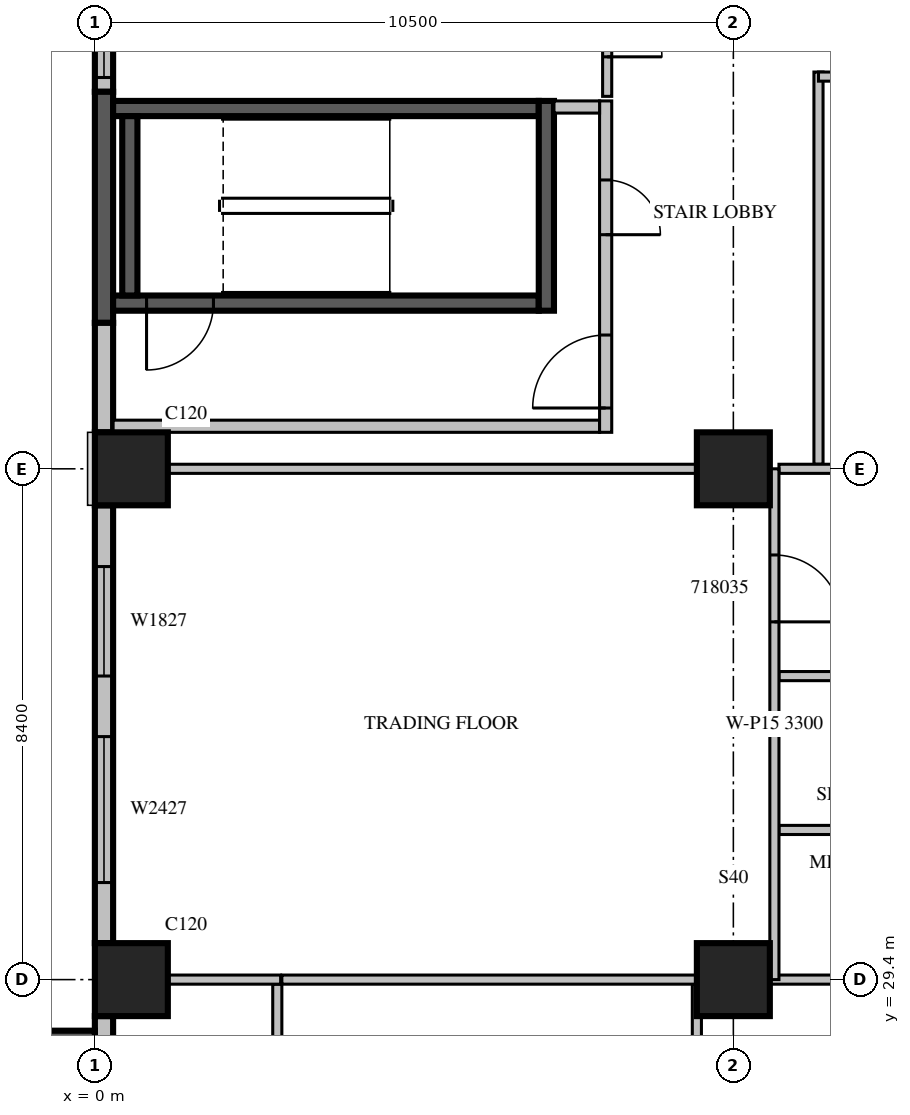
"""IFC4 building model, lengths in metres.
Left out: names, types, materials, properties, quantities, classifications, styles, units other than length and angle.
Written with IfcOpenShell. Run it as: python <this file> out.ifc"""

import sys

from ifc_helpers import new_model, si_unit, direction, frame, frame_2d, origin, origin_2d, place, context, subcontext, project, spatial, rectangle, extrude, source, transform, mapped, element, fill, save


model = new_model("IFC4")
c1 = context("Model", 3, precision=1e-05, world=origin(), true_north=direction((0.0, 1.0)))
c2 = subcontext(c1, "Body", "Model", "MODEL_VIEW")
j1 = project(units=[si_unit("LENGTHUNIT", "METRE"), si_unit("PLANEANGLEUNIT", "RADIAN")], contexts=[c1])
p1 = place(None, origin())
s1 = spatial("IfcSite", under=j1, at=p1, CompositionType="ELEMENT")
p2 = place(p1, origin())
s2 = spatial("IfcBuilding", under=s1, at=p2, CompositionType="ELEMENT")
p3 = place(p2, frame((0.0, 0.0, 86.7)))
s3 = spatial("IfcBuildingStorey", under=s2, at=p3, CompositionType="ELEMENT", Elevation=86.7)
m1 = source(origin(), c2, "Body", "SweptSolid", [
    extrude(rectangle(XDim=1.2, YDim=1.2, at=origin_2d()), origin(), (0.0, 0.0, 1.0), 4.2),
])
for number, where, z_axis, x_axis in (
    (1, (0.6, 29.4, 0.0), (0.0, 0.0, 1.0), (1.0, 0.0, 0.0)),
    (2, (10.5, 29.4, 0.0), (0.0, 0.0, 1.0), (1.0, 0.0, 0.0)),
    (3, (0.6, 37.8, 0.0), (0.0, 0.0, 1.0), (1.0, 0.0, 0.0)),
    (4, (10.5, 37.8, 0.0), (0.0, 0.0, 1.0), (1.0, 0.0, 0.0)),
):
    element("IfcColumn", number, at=place(p3, frame(where, z_axis=z_axis, x_axis=x_axis)), inside=s3, PredefinedType="COLUMN", context=c2, shape_type="MappedRepresentation", body=[
        mapped(m1, transform((0.0, 0.0, 0.0), scale=1.0)),
    ])
m2 = source(origin(), c2, "Body", "SweptSolid", [
    extrude(rectangle(XDim=1.6, YDim=0.3, at=frame_2d((0.8, 0.0))), origin(), (0.0, 0.0, 1.0), 3.8),
])
p4 = place(p3, frame((0.15, 45.6, 0.0), z_axis=(0.0, 0.0, 1.0), x_axis=(0.0, -1.0, 0.0)))
e5 = element("IfcWall", 5, at=p4, inside=s3, PredefinedType="STANDARD", context=c2, shape_type="MappedRepresentation", body=[
    mapped(m2, transform((0.0, 0.0, 0.0), scale=1.0)),
])
m3 = source(origin(), c2, "Body", "SweptSolid", [
    extrude(rectangle(XDim=1.2, YDim=2.7, at=frame_2d((0.6, 1.35))), frame((0.0, 0.16, 0.0), z_axis=(0.0, -1.0, 0.0), x_axis=(1.0, 0.0, 0.0)), (0.0, 0.0, 1.0), 0.32),
])
p5 = place(p4, frame((0.165, 0.0, 0.6)))
e6 = element("IfcOpeningElement", 6, at=p5, cuts=e5, PredefinedType="OPENING", context=c2, shape_type="MappedRepresentation", body=[
    mapped(m3, transform((0.0, 0.0, 0.0), scale=1.0)),
])
m4 = source(origin(), c2, "Body", "SweptSolid", [
    extrude(rectangle(XDim=3.8, YDim=0.3, at=frame_2d((1.9, 0.0))), origin(), (0.0, 0.0, 1.0), 3.8),
])
p6 = place(p3, frame((0.15, 44.0, 0.0), z_axis=(0.0, 0.0, 1.0), x_axis=(0.0, -1.0, 0.0)))
e7 = element("IfcWall", 7, at=p6, inside=s3, PredefinedType="SOLIDWALL", context=c2, shape_type="MappedRepresentation", body=[
    mapped(m4, transform((0.0, 0.0, 0.0), scale=1.0)),
])
m5 = source(origin(), c2, "Body", "SweptSolid", [
    extrude(rectangle(XDim=1.8, YDim=0.3, at=frame_2d((0.9, 0.0))), origin(), (0.0, 0.0, 1.0), 3.8),
])
p7 = place(p3, frame((0.15, 40.2, 0.0), z_axis=(0.0, 0.0, 1.0), x_axis=(0.0, -1.0, 0.0)))
e8 = element("IfcWall", 8, at=p7, inside=s3, PredefinedType="STANDARD", context=c2, shape_type="MappedRepresentation", body=[
    mapped(m5, transform((0.0, 0.0, 0.0), scale=1.0)),
])
m6 = source(origin(), c2, "Body", "SweptSolid", [
    extrude(rectangle(XDim=7.2, YDim=0.3, at=frame_2d((3.6, 0.0))), origin(), (0.0, 0.0, 1.0), 3.8),
])
p8 = place(p3, frame((0.15, 37.2, 0.0), z_axis=(0.0, 0.0, 1.0), x_axis=(0.0, -1.0, 0.0)))
e9 = element("IfcWall", 9, at=p8, inside=s3, PredefinedType="STANDARD", context=c2, shape_type="MappedRepresentation", body=[
    mapped(m6, transform((0.0, 0.0, 0.0), scale=1.0)),
])
m7 = source(origin(), c2, "Body", "SweptSolid", [
    extrude(rectangle(XDim=1.8, YDim=2.7, at=frame_2d((0.9, 1.35))), frame((0.0, 0.16, 0.0), z_axis=(0.0, -1.0, 0.0), x_axis=(1.0, 0.0, 0.0)), (0.0, 0.0, 1.0), 0.32),
])
p9 = place(p8, frame((1.008, 0.0, 0.6)))
e10 = element("IfcOpeningElement", 10, at=p9, cuts=e9, PredefinedType="OPENING", context=c2, shape_type="MappedRepresentation", body=[
    mapped(m7, transform((0.0, 0.0, 0.0), scale=1.0)),
])
m8 = source(origin(), c2, "Body", "SweptSolid", [
    extrude(rectangle(XDim=2.4, YDim=2.7, at=frame_2d((1.2, 1.35))), frame((0.0, 0.16, 0.0), z_axis=(0.0, -1.0, 0.0), x_axis=(1.0, 0.0, 0.0)), (0.0, 0.0, 1.0), 0.32),
])
p10 = place(p8, frame((3.804, 0.0, 0.6)))
e11 = element("IfcOpeningElement", 11, at=p10, cuts=e9, PredefinedType="OPENING", context=c2, shape_type="MappedRepresentation", body=[
    mapped(m8, transform((0.0, 0.0, 0.0), scale=1.0)),
])
p11 = place(p3, frame((0.15, 28.8, 0.0), z_axis=(0.0, 0.0, 1.0), x_axis=(0.0, -1.0, 0.0)))
e12 = element("IfcWall", 12, at=p11, inside=s3, PredefinedType="STANDARD", context=c2, shape_type="MappedRepresentation", body=[
    mapped(m6, transform((0.0, 0.0, 0.0), scale=1.0)),
])
m9 = source(origin(), c2, "Body", "SweptSolid", [
    extrude(rectangle(XDim=1.0, YDim=2.1, at=frame_2d((0.5, 1.05))), frame((0.0, 0.16, 0.0), z_axis=(0.0, -1.0, 0.0), x_axis=(1.0, 0.0, 0.0)), (0.0, 0.0, 1.0), 0.32),
])
p12 = place(p11, frame((1.84, 0.0, 0.0)))
e13 = element("IfcOpeningElement", 13, at=p12, cuts=e12, PredefinedType="OPENING", context=c2, shape_type="MappedRepresentation", body=[
    mapped(m9, transform((0.0, 0.0, 0.0), scale=1.0)),
])
m10 = source(origin(), c2, "Body", "SweptSolid", [
    extrude(rectangle(XDim=3.9, YDim=0.2, at=frame_2d((1.95, 0.0))), origin(), (0.0, 0.0, 1.0), 3.79),
])
p13 = place(p3, frame((0.0, 28.46, 0.0), z_axis=(0.0, 0.0, 1.0), x_axis=(-1.0, 0.0, 0.0)))
e14 = element("IfcWall", 14, at=p13, inside=s3, PredefinedType="SOLIDWALL", context=c2, shape_type="MappedRepresentation", body=[
    mapped(m10, transform((0.0, 0.0, 0.0), scale=1.0)),
])
m11 = source(origin(), c2, "Body", "SweptSolid", [
    extrude(rectangle(XDim=2.4, YDim=2.7, at=frame_2d((1.2, 1.35))), frame((0.0, 0.11, 0.0), z_axis=(0.0, -1.0, 0.0), x_axis=(1.0, 0.0, 0.0)), (0.0, 0.0, 1.0), 0.22),
])
p14 = place(p13, frame((0.75, 0.0, 0.6)))
e15 = element("IfcOpeningElement", 15, at=p14, cuts=e14, PredefinedType="OPENING", context=c2, shape_type="MappedRepresentation", body=[
    mapped(m11, transform((0.0, 0.0, 0.0), scale=1.0)),
])
m12 = source(origin(), c2, "Body", "SweptSolid", [
    extrude(rectangle(XDim=7.0, YDim=0.25, at=frame_2d((3.5, 0.0))), origin(), (0.0, 0.0, 1.0), 3.8),
])
p15 = place(p3, frame((0.3, 40.525, 0.0), z_axis=(0.0, 0.0, 1.0), x_axis=(1.0, 0.0, 0.0)))
e16 = element("IfcWall", 16, at=p15, inside=s3, PredefinedType="SOLIDWALL", context=c2, shape_type="MappedRepresentation", body=[
    mapped(m12, transform((0.0, 0.0, 0.0), scale=1.0)),
])
m13 = source(origin(), c2, "Body", "SweptSolid", [
    extrude(rectangle(XDim=1.1, YDim=2.1, at=frame_2d((0.55, 1.05))), frame((0.0, 0.135, 0.0), z_axis=(0.0, -1.0, 0.0), x_axis=(1.0, 0.0, 0.0)), (0.0, 0.0, 1.0), 0.27),
])
p16 = place(p15, frame((0.55, 0.0, 0.0)))
e17 = element("IfcOpeningElement", 17, at=p16, cuts=e16, PredefinedType="OPENING", context=c2, shape_type="MappedRepresentation", body=[
    mapped(m13, transform((0.0, 0.0, 0.0), scale=1.0)),
])
p17 = place(p3, frame((0.3, 43.725, 0.0), z_axis=(0.0, 0.0, 1.0), x_axis=(1.0, 0.0, 0.0)))
e18 = element("IfcWall", 18, at=p17, inside=s3, PredefinedType="SOLIDWALL", context=c2, shape_type="MappedRepresentation", body=[
    mapped(m12, transform((0.0, 0.0, 0.0), scale=1.0)),
])
m14 = source(origin(), c2, "Body", "SweptSolid", [
    extrude(rectangle(XDim=3.45, YDim=0.25, at=frame_2d((1.725, 0.0))), origin(), (0.0, 0.0, 1.0), 3.8),
])
p18 = place(p3, frame((7.425, 40.4, 0.0), z_axis=(0.0, 0.0, 1.0), x_axis=(0.0, 1.0, 0.0)))
e19 = element("IfcWall", 19, at=p18, inside=s3, PredefinedType="SOLIDWALL", context=c2, shape_type="MappedRepresentation", body=[
    mapped(m14, transform((0.0, 0.0, 0.0), scale=1.0)),
])
m15 = source(origin(), c2, "Body", "SweptSolid", [
    extrude(rectangle(XDim=2.95, YDim=0.25, at=frame_2d((1.475, 0.0))), origin(), (0.0, 0.0, 1.0), 3.8),
])
p19 = place(p3, frame((0.575, 40.65, 0.0), z_axis=(0.0, 0.0, 1.0), x_axis=(0.0, 1.0, 0.0)))
e20 = element("IfcWall", 20, at=p19, inside=s3, PredefinedType="SOLIDWALL", context=c2, shape_type="MappedRepresentation", body=[
    mapped(m15, transform((0.0, 0.0, 0.0), scale=1.0)),
])
m16 = source(origin(), c2, "Body", "SweptSolid", [
    extrude(rectangle(XDim=8.0, YDim=0.2, at=frame_2d((4.0, 0.0))), origin(), (0.0, 0.0, 1.0), 3.8),
])
p20 = place(p3, frame((0.3, 38.5, 0.0), z_axis=(0.0, 0.0, 1.0), x_axis=(1.0, 0.0, 0.0)))
e21 = element("IfcWall", 21, at=p20, inside=s3, PredefinedType="PARTITIONING", context=c2, shape_type="MappedRepresentation", body=[
    mapped(m16, transform((0.0, 0.0, 0.0), scale=1.0)),
])
m17 = source(origin(), c2, "Body", "SweptSolid", [
    extrude(rectangle(XDim=5.45, YDim=0.2, at=frame_2d((2.725, 0.0))), origin(), (0.0, 0.0, 1.0), 3.8),
])
p21 = place(p3, frame((8.4, 38.4, 0.0), z_axis=(0.0, 0.0, 1.0), x_axis=(0.0, 1.0, 0.0)))
e22 = element("IfcWall", 22, at=p21, inside=s3, PredefinedType="PARTITIONING", context=c2, shape_type="MappedRepresentation", body=[
    mapped(m17, transform((0.0, 0.0, 0.0), scale=1.0)),
])
m18 = source(origin(), c2, "Body", "SweptSolid", [
    extrude(rectangle(XDim=1.2, YDim=2.1, at=frame_2d((0.6, 1.05))), frame((0.0, 0.11, 0.0), z_axis=(0.0, -1.0, 0.0), x_axis=(1.0, 0.0, 0.0)), (0.0, 0.0, 1.0), 0.22),
])
p22 = place(p21, frame((0.4, 0.0, 0.0)))
e23 = element("IfcOpeningElement", 23, at=p22, cuts=e22, PredefinedType="OPENING", context=c2, shape_type="MappedRepresentation", body=[
    mapped(m18, transform((0.0, 0.0, 0.0), scale=1.0)),
])
m19 = source(origin(), c2, "Body", "SweptSolid", [
    extrude(rectangle(XDim=0.9, YDim=2.1, at=frame_2d((0.45, 1.05))), frame((0.0, 0.11, 0.0), z_axis=(0.0, -1.0, 0.0), x_axis=(1.0, 0.0, 0.0)), (0.0, 0.0, 1.0), 0.22),
])
p23 = place(p21, frame((3.25, 0.0, 0.0)))
e24 = element("IfcOpeningElement", 24, at=p23, cuts=e22, PredefinedType="OPENING", context=c2, shape_type="MappedRepresentation", body=[
    mapped(m19, transform((0.0, 0.0, 0.0), scale=1.0)),
])
m20 = source(origin(), c2, "Body", "SweptSolid", [
    extrude(rectangle(XDim=0.75, YDim=0.2, at=frame_2d((0.375, 0.0))), origin(), (0.0, 0.0, 1.0), 3.8),
])
p24 = place(p3, frame((7.55, 43.75, 0.0), z_axis=(0.0, 0.0, 1.0), x_axis=(1.0, 0.0, 0.0)))
e25 = element("IfcWall", 25, at=p24, inside=s3, PredefinedType="PARTITIONING", context=c2, shape_type="MappedRepresentation", body=[
    mapped(m20, transform((0.0, 0.0, 0.0), scale=1.0)),
])
m21 = source(origin(), c2, "Body", "SweptSolid", [
    extrude(rectangle(XDim=4.45, YDim=0.15, at=frame_2d((2.225, 0.0))), origin(), (0.0, 0.0, 1.0), 3.8),
])
p25 = place(p3, frame((9.9, 24.875, 0.0), z_axis=(0.0, 0.0, 1.0), x_axis=(0.0, 1.0, 0.0)))
e26 = element("IfcWall", 26, at=p25, inside=s3, PredefinedType="PARTITIONING", context=c2, shape_type="MappedRepresentation", body=[
    mapped(m21, transform((0.0, 0.0, 0.0), scale=1.0)),
])
m22 = source(origin(), c2, "Body", "SweptSolid", [
    extrude(rectangle(XDim=6.826, YDim=0.15, at=frame_2d((3.413, 0.0))), origin(), (0.0, 0.0, 1.0), 3.8),
])
p26 = place(p3, frame((9.901, 29.4, 0.0), z_axis=(0.0, 0.0, 1.0), x_axis=(-1.0, 0.0, 0.0)))
e27 = element("IfcWall", 27, at=p26, inside=s3, PredefinedType="PARTITIONING", context=c2, shape_type="MappedRepresentation", body=[
    mapped(m22, transform((0.0, 0.0, 0.0), scale=1.0)),
])
m23 = source(origin(), c2, "Body", "SweptSolid", [
    extrude(rectangle(XDim=3.601, YDim=0.15, at=frame_2d((1.8, 0.0))), origin(), (0.0, 0.0, 1.0), 3.8),
])
p27 = place(p3, frame((14.7, 29.4, 0.0), z_axis=(0.0, 0.0, 1.0), x_axis=(-1.0, 0.0, 0.0)))
e28 = element("IfcWall", 28, at=p27, inside=s3, PredefinedType="PARTITIONING", context=c2, shape_type="MappedRepresentation", body=[
    mapped(m23, transform((0.0, 0.0, 0.0), scale=1.0)),
])
m24 = source(origin(), c2, "Body", "SweptSolid", [
    extrude(rectangle(XDim=7.125, YDim=0.15, at=frame_2d((3.562, 0.0))), origin(), (0.0, 0.0, 1.0), 3.8),
])
p28 = place(p3, frame((3.0, 29.325, 0.0), z_axis=(0.0, 0.0, 1.0), x_axis=(0.0, -1.0, 0.0)))
e29 = element("IfcWall", 29, at=p28, inside=s3, PredefinedType="PARTITIONING", context=c2, shape_type="MappedRepresentation", body=[
    mapped(m24, transform((0.0, 0.0, 0.0), scale=1.0)),
])
m25 = source(origin(), c2, "Body", "SweptSolid", [
    extrude(rectangle(XDim=2.2, YDim=2.1, at=frame_2d((1.1, 1.05))), frame((0.0, 0.085, 0.0), z_axis=(0.0, -1.0, 0.0), x_axis=(1.0, 0.0, 0.0)), (0.0, 0.0, 1.0), 0.17),
])
p29 = place(p28, frame((4.725, 0.0, 0.0)))
e30 = element("IfcOpeningElement", 30, at=p29, cuts=e29, PredefinedType="OPENING", context=c2, shape_type="MappedRepresentation", body=[
    mapped(m25, transform((0.0, 0.0, 0.0), scale=1.0)),
])
m26 = source(origin(), c2, "Body", "SweptSolid", [
    extrude(rectangle(XDim=6.45, YDim=0.15, at=frame_2d((3.225, 0.0))), origin(), (0.0, 0.0, 1.0), 3.8),
])
p30 = place(p3, frame((11.9, 44.325, 0.0), z_axis=(0.0, 0.0, 1.0), x_axis=(0.0, -1.0, 0.0)))
e31 = element("IfcWall", 31, at=p30, inside=s3, PredefinedType="PARTITIONING", context=c2, shape_type="MappedRepresentation", body=[
    mapped(m26, transform((0.0, 0.0, 0.0), scale=1.0)),
])
m27 = source(origin(), c2, "Body", "SweptSolid", [
    extrude(rectangle(XDim=2.875, YDim=0.15, at=frame_2d((1.438, 0.0))), origin(), (0.0, 0.0, 1.0), 3.8),
])
p31 = place(p3, frame((14.775, 44.25, 0.0), z_axis=(0.0, 0.0, 1.0), x_axis=(-1.0, 0.0, 0.0)))
e32 = element("IfcWall", 32, at=p31, inside=s3, PredefinedType="PARTITIONING", context=c2, shape_type="MappedRepresentation", body=[
    mapped(m27, transform((0.0, 0.0, 0.0), scale=1.0)),
])
m28 = source(origin(), c2, "Body", "SweptSolid", [
    extrude(rectangle(XDim=2.2, YDim=0.15, at=frame_2d((1.1, 0.0))), origin(), (0.0, 0.0, 1.0), 3.8),
])
p32 = place(p3, frame((8.425, 43.925, 0.0), z_axis=(0.0, 0.0, 1.0), x_axis=(0.0, 1.0, 0.0)))
e33 = element("IfcWall", 33, at=p32, inside=s3, PredefinedType="PARTITIONING", context=c2, shape_type="MappedRepresentation", body=[
    mapped(m28, transform((0.0, 0.0, 0.0), scale=1.0)),
])
m29 = source(origin(), c2, "Body", "SweptSolid", [
    extrude(rectangle(XDim=0.9, YDim=2.1, at=frame_2d((0.45, 1.05))), frame((0.0, 0.085, 0.0), z_axis=(0.0, -1.0, 0.0), x_axis=(1.0, 0.0, 0.0)), (0.0, 0.0, 1.0), 0.17),
])
p33 = place(p32, frame((0.65, 0.0, 0.0)))
e34 = element("IfcOpeningElement", 34, at=p33, cuts=e33, PredefinedType="OPENING", context=c2, shape_type="MappedRepresentation", body=[
    mapped(m29, transform((0.0, 0.0, 0.0), scale=1.0)),
])
m30 = source(origin(), c2, "Body", "SweptSolid", [
    extrude(rectangle(XDim=3.45, YDim=0.15, at=frame_2d((1.725, 0.0))), origin(), (0.0, 0.0, 1.0), 3.8),
])
for number, where, z_axis, x_axis in (
    (35, (14.7, 31.861, 0.0), (0.0, 0.0, 1.0), (-1.0, 0.0, 0.0)),
    (36, (14.7, 34.391, 0.0), (0.0, 0.0, 1.0), (-1.0, 0.0, 0.0)),
):
    element("IfcWall", number, at=place(p3, frame(where, z_axis=z_axis, x_axis=x_axis)), inside=s3, PredefinedType="PARTITIONING", context=c2, shape_type="MappedRepresentation", body=[
        mapped(m30, transform((0.0, 0.0, 0.0), scale=1.0)),
    ])
m31 = source(origin(), c2, "Body", "SweptSolid", [
    extrude(rectangle(XDim=1.856, YDim=0.15, at=frame_2d((0.928, 0.0))), origin(), (0.0, 0.0, 1.0), 3.8),
])
p34 = place(p3, frame((3.055, 29.4, 0.0), z_axis=(0.0, 0.0, 1.0), x_axis=(-1.0, 0.0, 0.0)))
e37 = element("IfcWall", 37, at=p34, inside=s3, PredefinedType="PARTITIONING", context=c2, shape_type="MappedRepresentation", body=[
    mapped(m31, transform((0.0, 0.0, 0.0), scale=1.0)),
])
m32 = source(origin(), c2, "Body", "SweptSolid", [
    extrude(rectangle(XDim=8.702, YDim=0.15, at=frame_2d((4.351, 0.0))), origin(), (0.0, 0.0, 1.0), 3.8),
])
p35 = place(p3, frame((9.901, 37.8, 0.0), z_axis=(0.0, 0.0, 1.0), x_axis=(-1.0, 0.0, 0.0)))
e38 = element("IfcWall", 38, at=p35, inside=s3, PredefinedType="PARTITIONING", context=c2, shape_type="MappedRepresentation", body=[
    mapped(m32, transform((0.0, 0.0, 0.0), scale=1.0)),
])
p36 = place(p3, frame((14.7, 37.8, 0.0), z_axis=(0.0, 0.0, 1.0), x_axis=(-1.0, 0.0, 0.0)))
e39 = element("IfcWall", 39, at=p36, inside=s3, PredefinedType="PARTITIONING", context=c2, shape_type="MappedRepresentation", body=[
    mapped(m30, transform((0.0, 0.0, 0.0), scale=1.0)),
])
m33 = source(origin(), c2, "Body", "SweptSolid", [
    extrude(rectangle(XDim=8.4, YDim=0.15, at=frame_2d((4.2, 0.0))), origin(), (0.0, 0.0, 1.0), 3.3),
])
p37 = place(p3, frame((11.175, 29.4, 0.0), z_axis=(0.0, 0.0, 1.0), x_axis=(0.0, 1.0, 0.0)))
e40 = element("IfcWall", 40, at=p37, inside=s3, PredefinedType="PARTITIONING", context=c2, shape_type="MappedRepresentation", body=[
    mapped(m33, transform((0.0, 0.0, 0.0), scale=1.0)),
])
m34 = source(origin(), c2, "Body", "SweptSolid", [
    extrude(rectangle(XDim=1.1, YDim=2.1, at=frame_2d((0.55, 1.05))), frame((0.0, 0.085, 0.0), z_axis=(0.0, -1.0, 0.0), x_axis=(1.0, 0.0, 0.0)), (0.0, 0.0, 1.0), 0.17),
])
p38 = place(p37, frame((5.883, 0.0, 0.0)))
e41 = element("IfcOpeningElement", 41, at=p38, cuts=e40, PredefinedType="OPENING", context=c2, shape_type="MappedRepresentation", body=[
    mapped(m34, transform((0.0, 0.0, 0.0), scale=1.0)),
])
m35 = source(origin(), c2, "Body", "SweptSolid", [
    extrude(rectangle(XDim=1.2, YDim=2.7, at=frame_2d((0.6, 1.35))), frame((0.0, 0.03, 0.0), z_axis=(0.0, -1.0, 0.0), x_axis=(1.0, 0.0, 0.0)), (0.0, 0.0, 1.0), 0.06),
])
p39 = place(p5, origin())
e42 = element("IfcWindow", 42, at=p39, inside=s3, PartitioningType="SINGLE_PANEL", PredefinedType="WINDOW", context=c2, shape_type="MappedRepresentation", body=[
    mapped(m35, transform((0.0, 0.0, 0.0), scale=1.0)),
])
fill(e6, e42)
m36 = source(origin(), c2, "Body", "SweptSolid", [
    extrude(rectangle(XDim=1.8, YDim=2.7, at=frame_2d((0.9, 1.35))), frame((0.0, 0.03, 0.0), z_axis=(0.0, -1.0, 0.0), x_axis=(1.0, 0.0, 0.0)), (0.0, 0.0, 1.0), 0.06),
])
p40 = place(p9, origin())
e43 = element("IfcWindow", 43, at=p40, inside=s3, PartitioningType="SINGLE_PANEL", PredefinedType="WINDOW", context=c2, shape_type="MappedRepresentation", body=[
    mapped(m36, transform((0.0, 0.0, 0.0), scale=1.0)),
])
fill(e10, e43)
m37 = source(origin(), c2, "Body", "SweptSolid", [
    extrude(rectangle(XDim=2.4, YDim=2.7, at=frame_2d((1.2, 1.35))), frame((0.0, 0.03, 0.0), z_axis=(0.0, -1.0, 0.0), x_axis=(1.0, 0.0, 0.0)), (0.0, 0.0, 1.0), 0.06),
])
p41 = place(p10, origin())
e44 = element("IfcWindow", 44, at=p41, inside=s3, PartitioningType="SINGLE_PANEL", PredefinedType="WINDOW", context=c2, shape_type="MappedRepresentation", body=[
    mapped(m37, transform((0.0, 0.0, 0.0), scale=1.0)),
])
fill(e11, e44)
m38 = source(origin(), c2, "Body", "SweptSolid", [
    extrude(rectangle(XDim=1.1, YDim=2.1, at=frame_2d((0.55, 1.05))), frame((0.0, 0.025, 0.0), z_axis=(0.0, -1.0, 0.0), x_axis=(1.0, 0.0, 0.0)), (0.0, 0.0, 1.0), 0.05),
])
p42 = place(p16, origin())
e45 = element("IfcDoor", 45, at=p42, inside=s3, OperationType="SINGLE_SWING_RIGHT", PredefinedType="DOOR", context=c2, shape_type="MappedRepresentation", body=[
    mapped(m38, transform((0.0, 0.0, 0.0), scale=1.0)),
])
fill(e17, e45)
m39 = source(origin(), c2, "Body", "SweptSolid", [
    extrude(rectangle(XDim=1.2, YDim=2.1, at=frame_2d((0.6, 1.05))), frame((0.0, 0.025, 0.0), z_axis=(0.0, -1.0, 0.0), x_axis=(1.0, 0.0, 0.0)), (0.0, 0.0, 1.0), 0.05),
])
p43 = place(p22, origin())
e46 = element("IfcDoor", 46, at=p43, inside=s3, OperationType="SINGLE_SWING_LEFT", PredefinedType="DOOR", context=c2, shape_type="MappedRepresentation", body=[
    mapped(m39, transform((0.0, 0.0, 0.0), scale=1.0)),
])
fill(e23, e46)
m40 = source(origin(), c2, "Body", "SweptSolid", [
    extrude(rectangle(XDim=0.9, YDim=2.1, at=frame_2d((0.45, 1.05))), frame((0.0, 0.025, 0.0), z_axis=(0.0, -1.0, 0.0), x_axis=(1.0, 0.0, 0.0)), (0.0, 0.0, 1.0), 0.05),
])
p44 = place(p23, origin())
e47 = element("IfcDoor", 47, at=p44, inside=s3, OperationType="SINGLE_SWING_RIGHT", PredefinedType="DOOR", context=c2, shape_type="MappedRepresentation", body=[
    mapped(m40, transform((0.0, 0.0, 0.0), scale=1.0)),
])
fill(e24, e47)
p45 = place(p33, origin())
e48 = element("IfcDoor", 48, at=p45, inside=s3, OperationType="SINGLE_SWING_RIGHT", PredefinedType="DOOR", context=c2, shape_type="MappedRepresentation", body=[
    mapped(m40, transform((0.0, 0.0, 0.0), scale=1.0)),
])
fill(e34, e48)
p46 = place(p38, origin())
e49 = element("IfcDoor", 49, at=p46, inside=s3, OperationType="SINGLE_SWING_RIGHT", PredefinedType="DOOR", context=c2, shape_type="MappedRepresentation", body=[
    mapped(m38, transform((0.0, 0.0, 0.0), scale=1.0)),
])
fill(e41, e49)
save(model, sys.argv[1])
